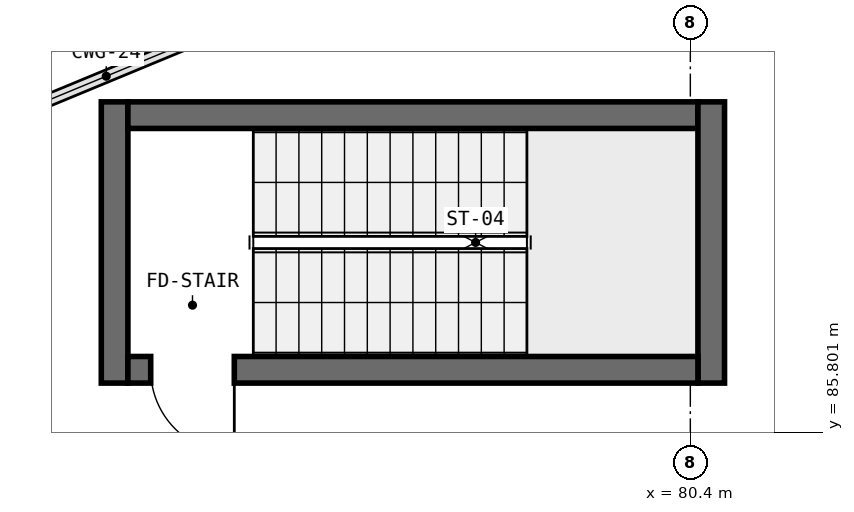
"""IFC4 building model, lengths in metres.
Left out: names, types, materials, properties, quantities, classifications, styles, units other than length and angle.
Written with IfcOpenShell. Run it as: python <this file> out.ifc"""

import sys

from ifc_helpers import new_model, si_unit, direction, frame, frame_2d, origin, place, context, subcontext, project, spatial, rectangle, extrude, element, fill, save


model = new_model("IFC4")
c1 = context("Model", 3, precision=1e-05, world=origin(), true_north=direction((0.0, 1.0)))
c2 = subcontext(c1, "Body", "Model", "MODEL_VIEW")
j1 = project(units=[si_unit("LENGTHUNIT", "METRE"), si_unit("PLANEANGLEUNIT", "RADIAN")], contexts=[c1])
p1 = place(None, origin())
s1 = spatial("IfcSite", under=j1, at=p1, CompositionType="ELEMENT")
p2 = place(p1, origin())
s2 = spatial("IfcBuilding", under=s1, at=p2, CompositionType="ELEMENT")
p3 = place(p2, frame((0.0, 0.0, 5.25)))
s3 = spatial("IfcBuildingStorey", under=s2, at=p3, CompositionType="ELEMENT", Elevation=5.25)
p4 = place(p3, frame((72.825, 86.45, 0.0), z_axis=(0.0, 0.0, 1.0), x_axis=(0.0, 1.0, 0.0)))
e1 = element("IfcWall", 1, at=p4, inside=s3, PredefinedType="SHEAR", context=c2, shape_type="SweptSolid", body=[
    extrude(rectangle(XDim=3.7, YDim=0.35, at=frame_2d((1.85, 0.0))), origin(), (0.0, 0.0, 1.0), 4.55),
])
p5 = place(p3, frame((73.0, 89.975, 0.0), z_axis=(0.0, 0.0, 1.0), x_axis=(1.0, 0.0, 0.0)))
e2 = element("IfcWall", 2, at=p5, inside=s3, PredefinedType="SHEAR", context=c2, shape_type="SweptSolid", body=[
    extrude(rectangle(XDim=7.5, YDim=0.35, at=frame_2d((3.75, 0.0))), origin(), (0.0, 0.0, 1.0), 4.55),
])
p6 = place(p3, frame((80.675, 90.15, 0.0), z_axis=(0.0, 0.0, 1.0), x_axis=(0.0, -1.0, 0.0)))
e3 = element("IfcWall", 3, at=p6, inside=s3, PredefinedType="SHEAR", context=c2, shape_type="SweptSolid", body=[
    extrude(rectangle(XDim=3.7, YDim=0.35, at=frame_2d((1.85, 0.0))), origin(), (0.0, 0.0, 1.0), 4.55),
])
p7 = place(p3, frame((80.5, 86.625, 0.0), z_axis=(0.0, 0.0, 1.0), x_axis=(-1.0, 0.0, 0.0)))
e4 = element("IfcWall", 4, at=p7, inside=s3, PredefinedType="SHEAR", context=c2, shape_type="SweptSolid", body=[
    extrude(rectangle(XDim=7.5, YDim=0.35, at=frame_2d((3.75, 0.0))), origin(), (0.0, 0.0, 1.0), 4.55),
])
p8 = place(p7, frame((6.1, 0.0, 0.0)))
e5 = element("IfcOpeningElement", 5, at=p8, cuts=e4, PredefinedType="OPENING", context=c2, shape_type="SweptSolid", body=[
    extrude(rectangle(XDim=1.1, YDim=2.15, at=frame_2d((0.55, 1.075))), frame((0.0, 0.185, 0.0), z_axis=(0.0, -1.0, 0.0), x_axis=(1.0, 0.0, 0.0)), (0.0, 0.0, 1.0), 0.37),
])
p9 = place(p3, frame((76.988, 93.341, 0.0), z_axis=(0.0, 0.0, 1.0), x_axis=(-0.92385889973, -0.382733240508, 0.0)))
e6 = element("IfcWall", 6, at=p9, inside=s3, PredefinedType="SOLIDWALL", context=c2, shape_type="SweptSolid", body=[
    extrude(rectangle(XDim=10.081, YDim=0.29, at=frame_2d((5.04, 0.0))), origin(), (0.0, 0.0, 1.0), 4.37),
])
p10 = place(p9, frame((4.405, 0.0, 0.95)))
e7 = element("IfcOpeningElement", 7, at=p10, cuts=e6, PredefinedType="OPENING", context=c2, shape_type="SweptSolid", body=[
    extrude(rectangle(XDim=1.27, YDim=1.43, at=frame_2d((0.635, 0.715))), frame((0.0, 0.155, 0.0), z_axis=(0.0, -1.0, 0.0), x_axis=(1.0, 0.0, 0.0)), (0.0, 0.0, 1.0), 0.31),
])
p11 = place(p8, origin())
e8 = element("IfcDoor", 8, at=p11, inside=s3, OperationType="SINGLE_SWING_LEFT", PredefinedType="DOOR", context=c2, shape_type="SweptSolid", body=[
    extrude(rectangle(XDim=1.1, YDim=2.15, at=frame_2d((0.55, 1.075))), frame((0.0, 0.025, 0.0), z_axis=(0.0, -1.0, 0.0), x_axis=(1.0, 0.0, 0.0)), (0.0, 0.0, 1.0), 0.05),
])
fill(e5, e8)
save(model, sys.argv[1])
